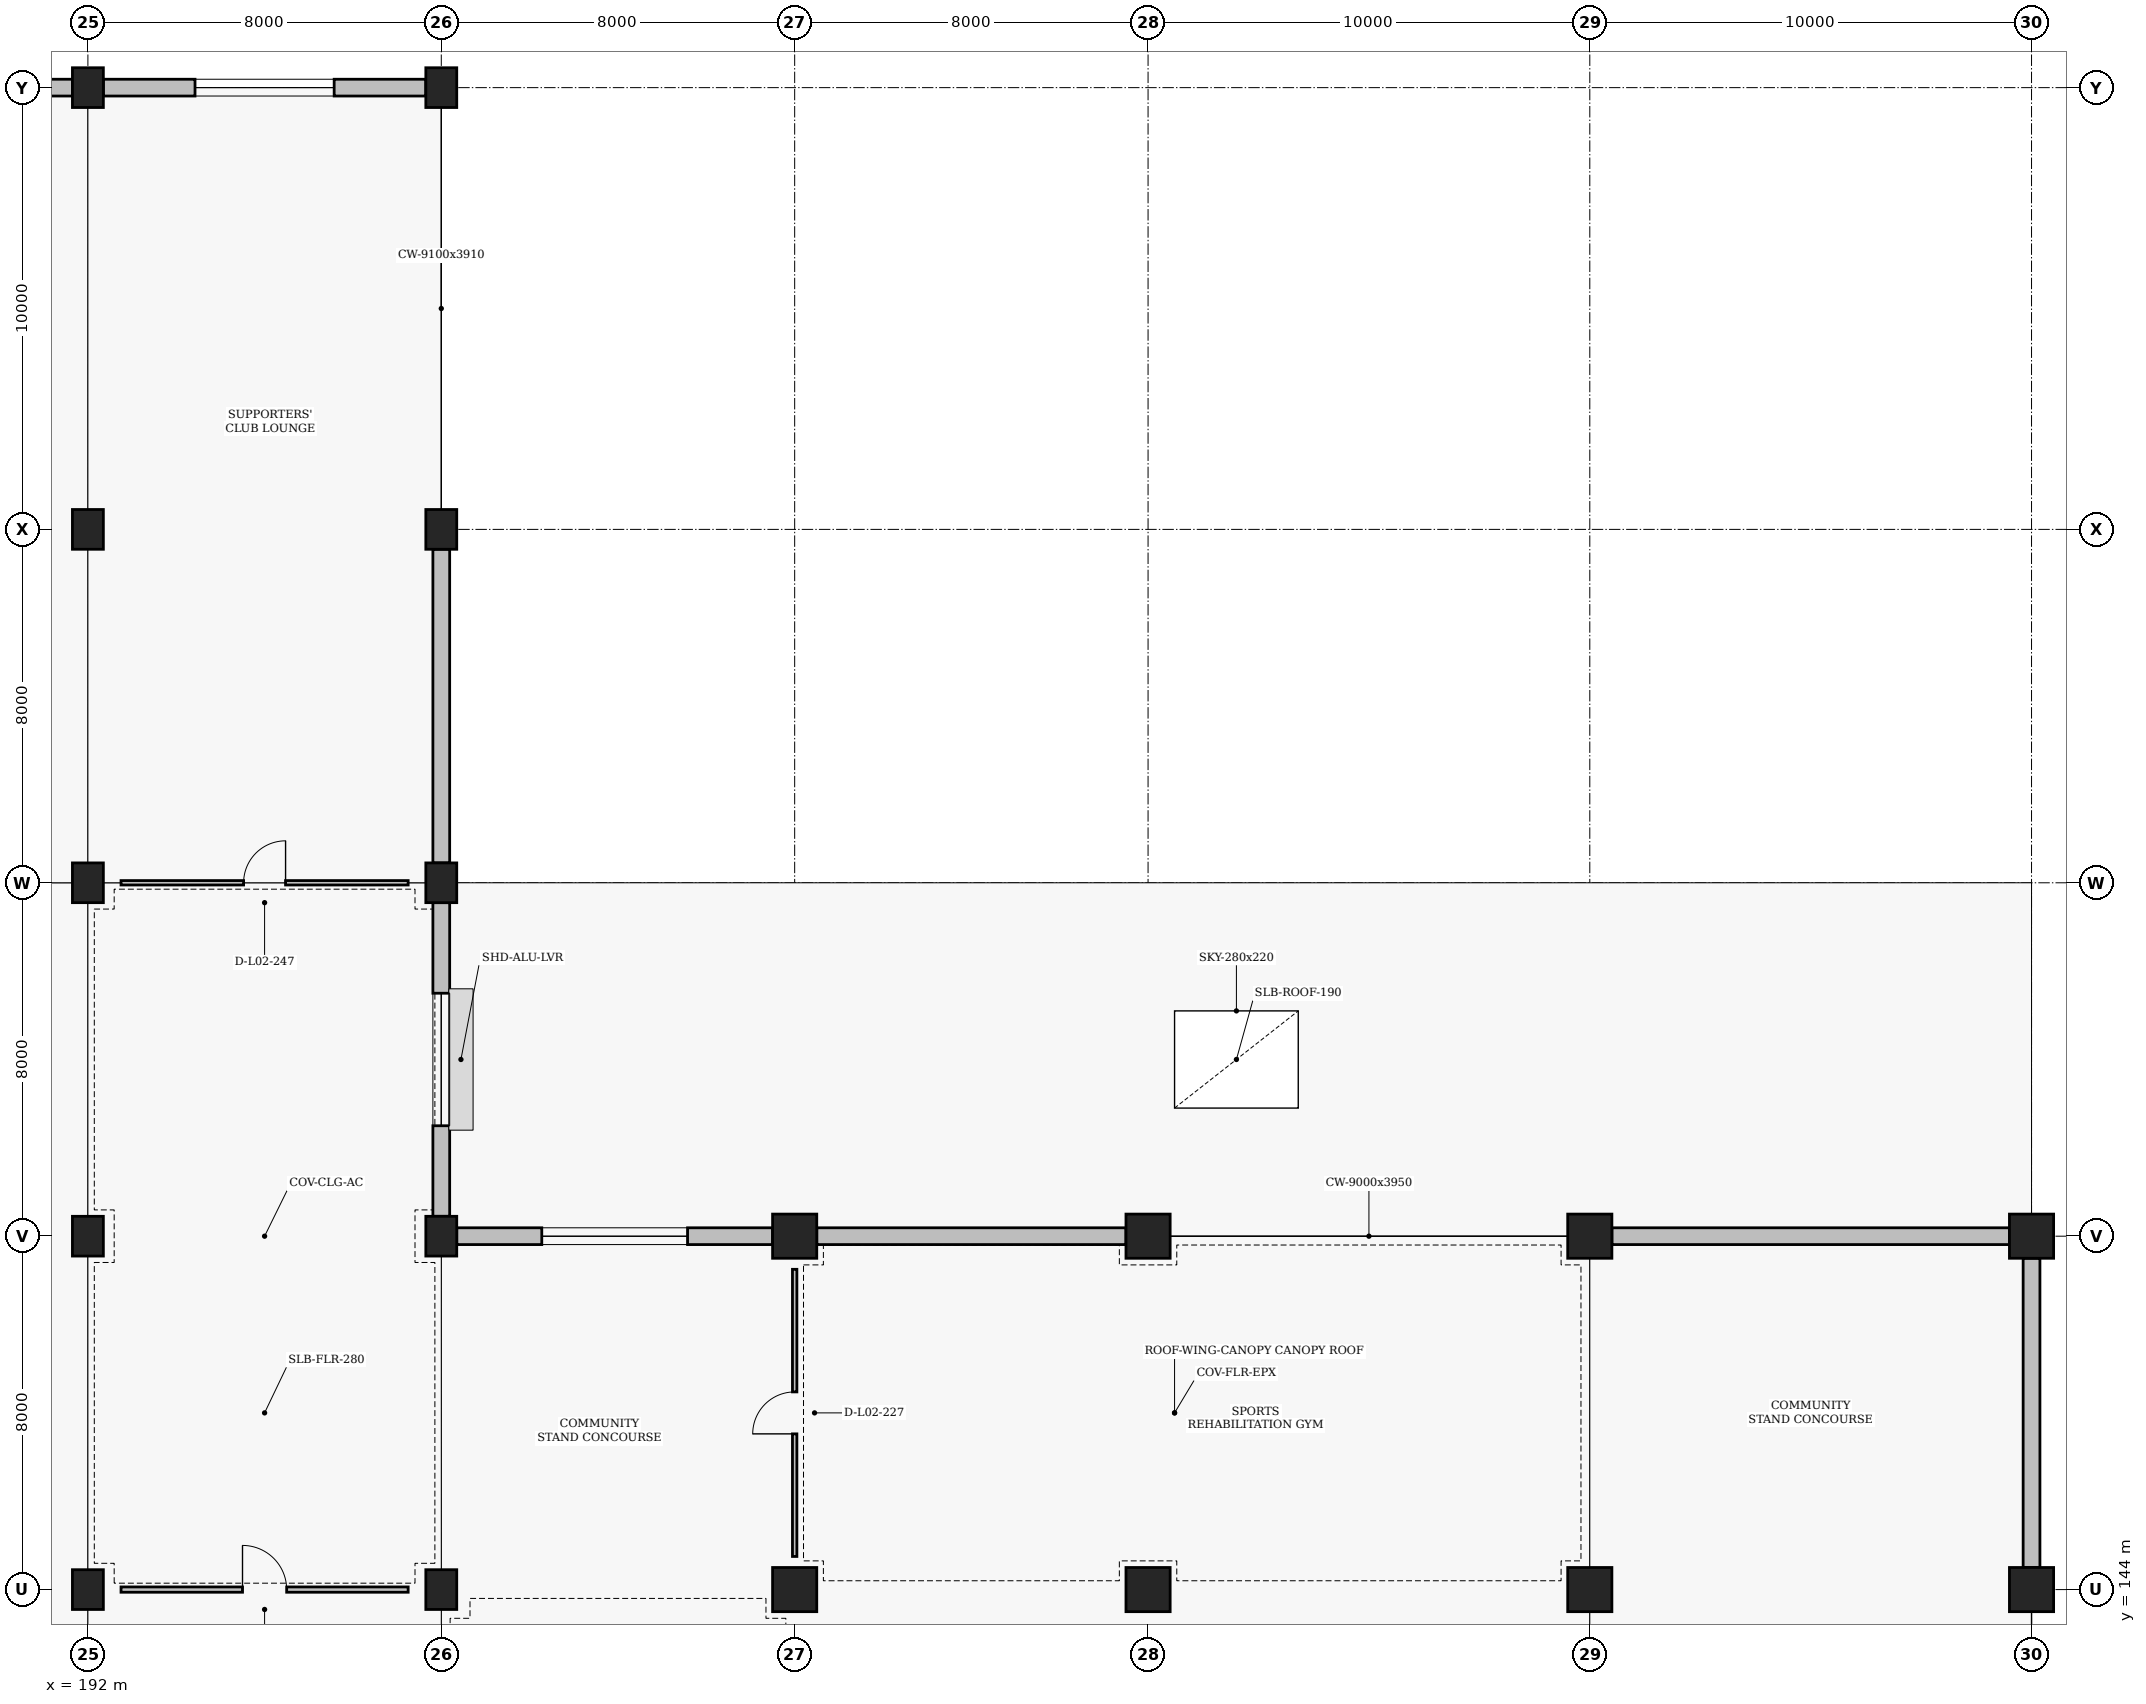
"""IFC4 building model, lengths in metres.
Left out: names, types, materials, properties, quantities, classifications, styles, units other than length and angle.
Written with IfcOpenShell. Run it as: python <this file> out.ifc"""

import sys

from ifc_helpers import new_model, si_unit, direction, frame, frame_2d, origin, origin_2d, place, context, subcontext, project, spatial, rectangle, extrude, element, fill, save


model = new_model("IFC4")
c1 = context("Model", 3, precision=1e-05, world=origin(), true_north=direction((0.0, 1.0)))
c2 = subcontext(c1, "Body", "Model", "MODEL_VIEW")
j1 = project(units=[si_unit("LENGTHUNIT", "METRE"), si_unit("PLANEANGLEUNIT", "RADIAN")], contexts=[c1])
p1 = place(None, origin())
s1 = spatial("IfcSite", under=j1, at=p1, CompositionType="ELEMENT")
p2 = place(p1, origin())
s2 = spatial("IfcBuilding", under=s1, at=p2, CompositionType="ELEMENT")
p3 = place(p2, frame((0.0, 0.0, 4.8)))
s3 = spatial("IfcBuildingStorey", under=s2, at=p3, CompositionType="ELEMENT", Elevation=4.8)
for number, where, z_axis, x_axis in (
    (1, (192.0, 144.0, 0.0), (0.0, 0.0, 1.0), (1.0, 0.0, 0.0)),
    (2, (192.0, 152.0, 0.0), (0.0, 0.0, 1.0), (1.0, 0.0, 0.0)),
    (3, (192.0, 160.0, 0.0), (0.0, 0.0, 1.0), (1.0, 0.0, 0.0)),
    (4, (192.0, 168.0, 0.0), (0.0, 0.0, 1.0), (1.0, 0.0, 0.0)),
    (5, (192.0, 178.0, 0.0), (0.0, 0.0, 1.0), (1.0, 0.0, 0.0)),
    (6, (200.0, 144.0, 0.0), (0.0, 0.0, 1.0), (1.0, 0.0, 0.0)),
    (7, (200.0, 152.0, 0.0), (0.0, 0.0, 1.0), (1.0, 0.0, 0.0)),
    (8, (200.0, 160.0, 0.0), (0.0, 0.0, 1.0), (1.0, 0.0, 0.0)),
    (9, (200.0, 168.0, 0.0), (0.0, 0.0, 1.0), (1.0, 0.0, 0.0)),
    (10, (200.0, 178.0, 0.0), (0.0, 0.0, 1.0), (1.0, 0.0, 0.0)),
):
    element("IfcColumn", number, at=place(p3, frame(where, z_axis=z_axis, x_axis=x_axis)), inside=s3, PredefinedType="COLUMN", context=c2, shape_type="SweptSolid", body=[
        extrude(rectangle(XDim=0.7, YDim=0.9, at=origin_2d()), origin(), (0.0, 0.0, 1.0), 4.8),
    ])
for number, where, z_axis, x_axis in (
    (11, (208.0, 144.0, 0.0), (0.0, 0.0, 1.0), (1.0, 0.0, 0.0)),
    (12, (208.0, 152.0, 0.0), (0.0, 0.0, 1.0), (1.0, 0.0, 0.0)),
    (13, (216.0, 144.0, 0.0), (0.0, 0.0, 1.0), (1.0, 0.0, 0.0)),
    (14, (216.0, 152.0, 0.0), (0.0, 0.0, 1.0), (1.0, 0.0, 0.0)),
    (15, (226.0, 144.0, 0.0), (0.0, 0.0, 1.0), (1.0, 0.0, 0.0)),
    (16, (226.0, 152.0, 0.0), (0.0, 0.0, 1.0), (1.0, 0.0, 0.0)),
    (17, (236.0, 144.0, 0.0), (0.0, 0.0, 1.0), (1.0, 0.0, 0.0)),
    (18, (236.0, 152.0, 0.0), (0.0, 0.0, 1.0), (1.0, 0.0, 0.0)),
):
    element("IfcColumn", number, at=place(p3, frame(where, z_axis=z_axis, x_axis=x_axis)), inside=s3, PredefinedType="COLUMN", context=c2, shape_type="SweptSolid", body=[
        extrude(rectangle(XDim=1.0, YDim=1.0, at=origin_2d()), origin(), (0.0, 0.0, 1.0), 4.8),
    ])
p4 = place(p3, frame((184.35, 178.0, 0.0), z_axis=(0.0, 0.0, 1.0), x_axis=(1.0, 0.0, 0.0)))
e19 = element("IfcWall", 19, at=p4, inside=s3, PredefinedType="SOLIDWALL", context=c2, shape_type="SweptSolid", body=[
    extrude(rectangle(XDim=7.3, YDim=0.38, at=frame_2d((3.65, 0.0))), origin(), (0.0, 0.0, 1.0), 3.71),
])
p5 = place(p3, frame((200.0, 152.45, 0.0), z_axis=(0.0, 0.0, 1.0), x_axis=(0.0, 1.0, 0.0)))
e20 = element("IfcWall", 20, at=p5, inside=s3, PredefinedType="SOLIDWALL", context=c2, shape_type="SweptSolid", body=[
    extrude(rectangle(XDim=7.1, YDim=0.38, at=frame_2d((3.55, 0.0))), origin(), (0.0, 0.0, 1.0), 3.91),
])
p6 = place(p5, frame((2.05, 0.0, 0.95)))
e21 = element("IfcOpeningElement", 21, at=p6, cuts=e20, PredefinedType="OPENING", context=c2, shape_type="SweptSolid", body=[
    extrude(rectangle(XDim=3.0, YDim=2.1, at=frame_2d((1.5, 1.05))), frame((0.0, 0.2, 0.0), z_axis=(0.0, -1.0, 0.0), x_axis=(1.0, 0.0, 0.0)), (0.0, 0.0, 1.0), 0.4),
])
p7 = place(p3, frame((200.0, 160.45, 0.0), z_axis=(0.0, 0.0, 1.0), x_axis=(0.0, 1.0, 0.0)))
e22 = element("IfcWall", 22, at=p7, inside=s3, PredefinedType="SOLIDWALL", context=c2, shape_type="SweptSolid", body=[
    extrude(rectangle(XDim=7.1, YDim=0.38, at=frame_2d((3.55, 0.0))), origin(), (0.0, 0.0, 1.0), 3.91),
])
p8 = place(p3, frame((192.35, 178.0, 0.0), z_axis=(0.0, 0.0, 1.0), x_axis=(1.0, 0.0, 0.0)))
e23 = element("IfcWall", 23, at=p8, inside=s3, PredefinedType="SOLIDWALL", context=c2, shape_type="SweptSolid", body=[
    extrude(rectangle(XDim=7.3, YDim=0.38, at=frame_2d((3.65, 0.0))), origin(), (0.0, 0.0, 1.0), 3.71),
])
p9 = place(p8, frame((2.075, 0.0, 0.95)))
e24 = element("IfcOpeningElement", 24, at=p9, cuts=e23, PredefinedType="OPENING", context=c2, shape_type="SweptSolid", body=[
    extrude(rectangle(XDim=3.15, YDim=2.15, at=frame_2d((1.575, 1.075))), frame((0.0, 0.2, 0.0), z_axis=(0.0, -1.0, 0.0), x_axis=(1.0, 0.0, 0.0)), (0.0, 0.0, 1.0), 0.4),
])
p10 = place(p3, frame((200.35, 152.0, 0.0), z_axis=(0.0, 0.0, 1.0), x_axis=(1.0, 0.0, 0.0)))
e25 = element("IfcWall", 25, at=p10, inside=s3, PredefinedType="SOLIDWALL", context=c2, shape_type="SweptSolid", body=[
    extrude(rectangle(XDim=7.15, YDim=0.38, at=frame_2d((3.575, 0.0))), origin(), (0.0, 0.0, 1.0), 3.91),
])
p11 = place(p10, frame((1.925, 0.0, 0.95)))
e26 = element("IfcOpeningElement", 26, at=p11, cuts=e25, PredefinedType="OPENING", context=c2, shape_type="SweptSolid", body=[
    extrude(rectangle(XDim=3.3, YDim=2.2, at=frame_2d((1.65, 1.1))), frame((0.0, 0.2, 0.0), z_axis=(0.0, -1.0, 0.0), x_axis=(1.0, 0.0, 0.0)), (0.0, 0.0, 1.0), 0.4),
])
p12 = place(p3, frame((208.5, 152.0, 0.0), z_axis=(0.0, 0.0, 1.0), x_axis=(1.0, 0.0, 0.0)))
e27 = element("IfcWall", 27, at=p12, inside=s3, PredefinedType="SOLIDWALL", context=c2, shape_type="SweptSolid", body=[
    extrude(rectangle(XDim=7.0, YDim=0.38, at=frame_2d((3.5, 0.0))), origin(), (0.0, 0.0, 1.0), 3.95),
])
p13 = place(p3, frame((226.5, 152.0, 0.0), z_axis=(0.0, 0.0, 1.0), x_axis=(1.0, 0.0, 0.0)))
e28 = element("IfcWall", 28, at=p13, inside=s3, PredefinedType="SOLIDWALL", context=c2, shape_type="SweptSolid", body=[
    extrude(rectangle(XDim=9.0, YDim=0.38, at=frame_2d((4.5, 0.0))), origin(), (0.0, 0.0, 1.0), 3.95),
])
p14 = place(p3, frame((236.0, 144.5, 0.0), z_axis=(0.0, 0.0, 1.0), x_axis=(0.0, 1.0, 0.0)))
e29 = element("IfcWall", 29, at=p14, inside=s3, PredefinedType="SOLIDWALL", context=c2, shape_type="SweptSolid", body=[
    extrude(rectangle(XDim=7.0, YDim=0.38, at=frame_2d((3.5, 0.0))), origin(), (0.0, 0.0, 1.0), 3.81),
])
p15 = place(p3, frame((208.0, 144.75, 0.0), z_axis=(0.0, 0.0, 1.0), x_axis=(0.0, 1.0, 0.0)))
e30 = element("IfcWall", 30, at=p15, inside=s3, PredefinedType="PARTITIONING", context=c2, shape_type="SweptSolid", body=[
    extrude(rectangle(XDim=6.5, YDim=0.1, at=frame_2d((3.25, 0.0))), origin(), (0.0, 0.0, 1.0), 3.97),
])
p16 = place(p15, frame((2.775, 0.0, 0.0)))
e31 = element("IfcOpeningElement", 31, at=p16, cuts=e30, PredefinedType="OPENING", context=c2, shape_type="SweptSolid", body=[
    extrude(rectangle(XDim=0.95, YDim=2.1, at=frame_2d((0.475, 1.05))), frame((0.0, 0.06, 0.0), z_axis=(0.0, -1.0, 0.0), x_axis=(1.0, 0.0, 0.0)), (0.0, 0.0, 1.0), 0.12),
])
p17 = place(p3, frame((192.75, 144.0, 0.0), z_axis=(0.0, 0.0, 1.0), x_axis=(1.0, 0.0, 0.0)))
e32 = element("IfcWall", 32, at=p17, inside=s3, PredefinedType="PARTITIONING", context=c2, shape_type="SweptSolid", body=[
    extrude(rectangle(XDim=6.5, YDim=0.12, at=frame_2d((3.25, 0.0))), origin(), (0.0, 0.0, 1.0), 3.61),
])
p18 = place(p17, frame((2.75, 0.0, 0.0)))
e33 = element("IfcOpeningElement", 33, at=p18, cuts=e32, PredefinedType="OPENING", context=c2, shape_type="SweptSolid", body=[
    extrude(rectangle(XDim=1.0, YDim=2.1, at=frame_2d((0.5, 1.05))), frame((0.0, 0.07, 0.0), z_axis=(0.0, -1.0, 0.0), x_axis=(1.0, 0.0, 0.0)), (0.0, 0.0, 1.0), 0.14),
])
p19 = place(p3, frame((192.75, 160.0, 0.0), z_axis=(0.0, 0.0, 1.0), x_axis=(1.0, 0.0, 0.0)))
e34 = element("IfcWall", 34, at=p19, inside=s3, PredefinedType="PARTITIONING", context=c2, shape_type="SweptSolid", body=[
    extrude(rectangle(XDim=6.5, YDim=0.1, at=frame_2d((3.25, 0.0))), origin(), (0.0, 0.0, 1.0), 3.91),
])
p20 = place(p19, frame((2.775, 0.0, 0.0)))
e35 = element("IfcOpeningElement", 35, at=p20, cuts=e34, PredefinedType="OPENING", context=c2, shape_type="SweptSolid", body=[
    extrude(rectangle(XDim=0.95, YDim=2.1, at=frame_2d((0.475, 1.05))), frame((0.0, 0.06, 0.0), z_axis=(0.0, -1.0, 0.0), x_axis=(1.0, 0.0, 0.0)), (0.0, 0.0, 1.0), 0.12),
])
p21 = place(p6, origin())
e36 = element("IfcWindow", 36, at=p21, inside=s3, PartitioningType="SINGLE_PANEL", PredefinedType="WINDOW", context=c2, shape_type="SweptSolid", body=[
    extrude(rectangle(XDim=3.0, YDim=2.1, at=frame_2d((1.5, 1.05))), frame((0.0, 0.03, 0.0), z_axis=(0.0, -1.0, 0.0), x_axis=(1.0, 0.0, 0.0)), (0.0, 0.0, 1.0), 0.06),
])
fill(e21, e36)
p22 = place(p9, origin())
e37 = element("IfcWindow", 37, at=p22, inside=s3, PartitioningType="SINGLE_PANEL", PredefinedType="WINDOW", context=c2, shape_type="SweptSolid", body=[
    extrude(rectangle(XDim=3.15, YDim=2.15, at=frame_2d((1.575, 1.075))), frame((0.0, 0.03, 0.0), z_axis=(0.0, -1.0, 0.0), x_axis=(1.0, 0.0, 0.0)), (0.0, 0.0, 1.0), 0.06),
])
fill(e24, e37)
p23 = place(p11, origin())
e38 = element("IfcWindow", 38, at=p23, inside=s3, PartitioningType="SINGLE_PANEL", PredefinedType="WINDOW", context=c2, shape_type="SweptSolid", body=[
    extrude(rectangle(XDim=3.3, YDim=2.2, at=frame_2d((1.65, 1.1))), frame((0.0, 0.03, 0.0), z_axis=(0.0, -1.0, 0.0), x_axis=(1.0, 0.0, 0.0)), (0.0, 0.0, 1.0), 0.06),
])
fill(e26, e38)
p24 = place(p3, frame((0.0, 0.0, -0.19)))
p25 = place(p24, frame((218.0, 156.0, 0.14)))
e39 = element("IfcWindow", 39, at=p25, inside=s3, PartitioningType="SINGLE_PANEL", PredefinedType="SKYLIGHT", context=c2, shape_type="SweptSolid", body=[
    extrude(rectangle(XDim=2.8, YDim=2.2, at=origin_2d()), origin(), (0.0, 0.0, 1.0), 0.05),
])
p26 = place(p16, origin())
e40 = element("IfcDoor", 40, at=p26, inside=s3, OperationType="SINGLE_SWING_LEFT", PredefinedType="DOOR", context=c2, shape_type="SweptSolid", body=[
    extrude(rectangle(XDim=0.95, YDim=2.1, at=frame_2d((0.475, 1.05))), frame((0.0, 0.025, 0.0), z_axis=(0.0, -1.0, 0.0), x_axis=(1.0, 0.0, 0.0)), (0.0, 0.0, 1.0), 0.05),
])
fill(e31, e40)
p27 = place(p18, origin())
e41 = element("IfcDoor", 41, at=p27, inside=s3, OperationType="SINGLE_SWING_LEFT", PredefinedType="DOOR", context=c2, shape_type="SweptSolid", body=[
    extrude(rectangle(XDim=1.0, YDim=2.1, at=frame_2d((0.5, 1.05))), frame((0.0, 0.025, 0.0), z_axis=(0.0, -1.0, 0.0), x_axis=(1.0, 0.0, 0.0)), (0.0, 0.0, 1.0), 0.05),
])
fill(e33, e41)
p28 = place(p20, origin())
e42 = element("IfcDoor", 42, at=p28, inside=s3, OperationType="SINGLE_SWING_RIGHT", PredefinedType="DOOR", context=c2, shape_type="SweptSolid", body=[
    extrude(rectangle(XDim=0.95, YDim=2.1, at=frame_2d((0.475, 1.05))), frame((0.0, 0.025, 0.0), z_axis=(0.0, -1.0, 0.0), x_axis=(1.0, 0.0, 0.0)), (0.0, 0.0, 1.0), 0.05),
])
fill(e35, e42)
save(model, sys.argv[1])
